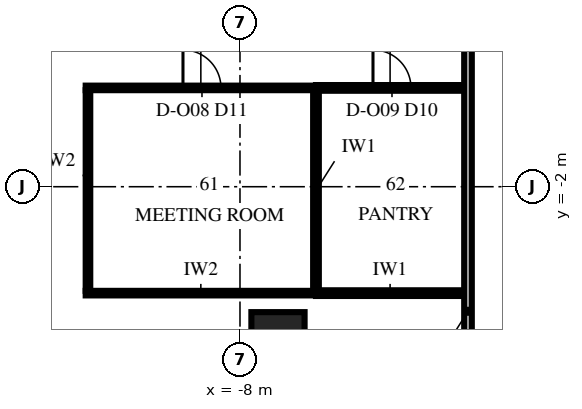
"""IFC4 building model, lengths in metres.
Left out: names, types, materials, properties, quantities, classifications, styles, units other than length and angle.
Written with IfcOpenShell. Run it as: python <this file> out.ifc"""

import sys

from ifc_helpers import new_model, si_unit, direction, frame, frame_2d, origin, origin_2d, place, context, subcontext, project, spatial, rectangle, extrude, element, fill, save


model = new_model("IFC4")
c1 = context("Model", 3, precision=1e-05, world=origin(), true_north=direction((0.0, 1.0)))
c2 = subcontext(c1, "Body", "Model", "MODEL_VIEW")
j1 = project(units=[si_unit("LENGTHUNIT", "METRE"), si_unit("PLANEANGLEUNIT", "RADIAN")], contexts=[c1])
p1 = place(None, origin())
s1 = spatial("IfcSite", under=j1, at=p1, CompositionType="ELEMENT")
p2 = place(p1, origin())
s2 = spatial("IfcBuilding", under=s1, at=p2, CompositionType="ELEMENT")
p3 = place(p2, frame((0.0, 0.0, 190.0)))
s3 = spatial("IfcBuildingStorey", under=s2, at=p3, CompositionType="ELEMENT", Elevation=190.0)
p4 = place(p3, frame((-7.0, -6.0, 0.0), z_axis=(0.0, 0.0, 1.0), x_axis=(1.0, 0.0, 0.0)))
e1 = element("IfcColumn", 1, at=p4, inside=s3, PredefinedType="COLUMN", context=c2, shape_type="SweptSolid", body=[
    extrude(rectangle(XDim=1.4, YDim=1.4, at=origin_2d()), origin(), (0.0, 0.0, 1.0), 4.0),
])
p5 = place(p3, frame((-12.06, -4.8, 0.0), z_axis=(0.0, 0.0, 1.0), x_axis=(1.0, 0.0, 0.0)))
e2 = element("IfcWall", 2, at=p5, inside=s3, PredefinedType="PARTITIONING", context=c2, shape_type="SweptSolid", body=[
    extrude(rectangle(XDim=6.06, YDim=0.12, at=frame_2d((3.03, 0.0))), origin(), (0.0, 0.0, 1.0), 3.25),
])
p6 = place(p3, frame((-6.0, -4.8, 0.0), z_axis=(0.0, 0.0, 1.0), x_axis=(1.0, 0.0, 0.0)))
e3 = element("IfcWall", 3, at=p6, inside=s3, PredefinedType="PARTITIONING", context=c2, shape_type="SweptSolid", body=[
    extrude(rectangle(XDim=3.9, YDim=0.15, at=frame_2d((1.95, 0.0))), origin(), (0.0, 0.0, 1.0), 3.25),
])
p7 = place(p3, frame((-12.06, 0.6, 0.0), z_axis=(0.0, 0.0, 1.0), x_axis=(1.0, 0.0, 0.0)))
e4 = element("IfcWall", 4, at=p7, inside=s3, PredefinedType="PARTITIONING", context=c2, shape_type="SweptSolid", body=[
    extrude(rectangle(XDim=6.06, YDim=0.12, at=frame_2d((3.03, 0.0))), origin(), (0.0, 0.0, 1.0), 3.25),
])
p8 = place(p7, frame((2.56, 0.0, 0.0)))
e5 = element("IfcOpeningElement", 5, at=p8, cuts=e4, PredefinedType="OPENING", context=c2, shape_type="SweptSolid", body=[
    extrude(rectangle(XDim=1.0, YDim=2.4, at=frame_2d((0.5, 1.2))), frame((0.0, 0.075, 0.0), z_axis=(0.0, -1.0, 0.0), x_axis=(1.0, 0.0, 0.0)), (0.0, 0.0, 1.0), 0.15),
])
p9 = place(p3, frame((-6.0, 0.6, 0.0), z_axis=(0.0, 0.0, 1.0), x_axis=(1.0, 0.0, 0.0)))
e6 = element("IfcWall", 6, at=p9, inside=s3, PredefinedType="PARTITIONING", context=c2, shape_type="SweptSolid", body=[
    extrude(rectangle(XDim=3.9, YDim=0.15, at=frame_2d((1.95, 0.0))), origin(), (0.0, 0.0, 1.0), 3.25),
])
p10 = place(p9, frame((1.5, 0.0, 0.0)))
e7 = element("IfcOpeningElement", 7, at=p10, cuts=e6, PredefinedType="OPENING", context=c2, shape_type="SweptSolid", body=[
    extrude(rectangle(XDim=1.0, YDim=2.3, at=frame_2d((0.5, 1.15))), frame((0.0, 0.09, 0.0), z_axis=(0.0, -1.0, 0.0), x_axis=(1.0, 0.0, 0.0)), (0.0, 0.0, 1.0), 0.18),
])
p11 = place(p3, frame((-12.0, -4.74, 0.0), z_axis=(0.0, 0.0, 1.0), x_axis=(0.0, 1.0, 0.0)))
e8 = element("IfcWall", 8, at=p11, inside=s3, PredefinedType="PARTITIONING", context=c2, shape_type="SweptSolid", body=[
    extrude(rectangle(XDim=5.28, YDim=0.12, at=frame_2d((2.64, 0.0))), origin(), (0.0, 0.0, 1.0), 3.85),
])
p12 = place(p3, frame((-6.0, -4.725, 0.0), z_axis=(0.0, 0.0, 1.0), x_axis=(0.0, 1.0, 0.0)))
e9 = element("IfcWall", 9, at=p12, inside=s3, PredefinedType="PARTITIONING", context=c2, shape_type="SweptSolid", body=[
    extrude(rectangle(XDim=5.25, YDim=0.15, at=frame_2d((2.625, 0.0))), origin(), (0.0, 0.0, 1.0), 3.25),
])
p13 = place(p3, frame((-2.0, -16.375, 0.0), z_axis=(0.0, 0.0, 1.0), x_axis=(0.0, 1.0, 0.0)))
e10 = element("IfcWall", 10, at=p13, inside=s3, PredefinedType="PARTITIONING", context=c2, shape_type="SweptSolid", body=[
    extrude(rectangle(XDim=22.195, YDim=0.2, at=frame_2d((11.098, 0.0))), origin(), (0.0, 0.0, 1.0), 2.842),
])
p14 = place(p8, origin())
e11 = element("IfcDoor", 11, at=p14, inside=s3, OperationType="SINGLE_SWING_RIGHT", PredefinedType="DOOR", context=c2, shape_type="SweptSolid", body=[
    extrude(rectangle(XDim=1.0, YDim=2.4, at=frame_2d((0.5, 1.2))), frame((0.0, 0.06, 0.0), z_axis=(0.0, -1.0, 0.0), x_axis=(1.0, 0.0, 0.0)), (0.0, 0.0, 1.0), 0.12),
])
fill(e5, e11)
p15 = place(p10, origin())
e12 = element("IfcDoor", 12, at=p15, inside=s3, OperationType="SINGLE_SWING_LEFT", PredefinedType="DOOR", context=c2, shape_type="SweptSolid", body=[
    extrude(rectangle(XDim=1.0, YDim=2.3, at=frame_2d((0.5, 1.15))), frame((0.0, 0.075, 0.0), z_axis=(0.0, -1.0, 0.0), x_axis=(1.0, 0.0, 0.0)), (0.0, 0.0, 1.0), 0.149),
])
fill(e7, e12)
save(model, sys.argv[1])
